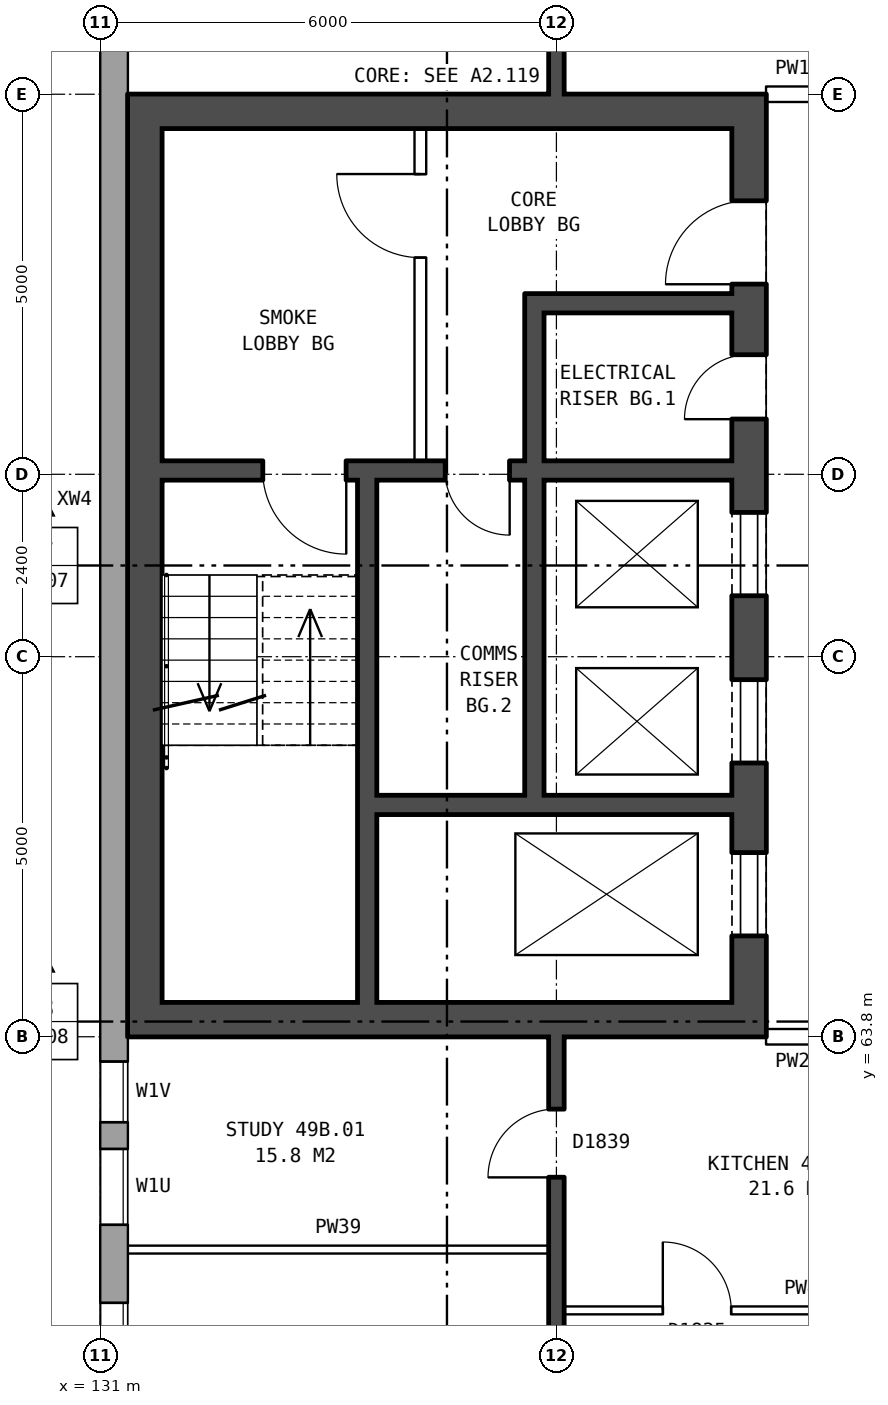
"""IFC4 building model, lengths in metres.
Left out: names, types, materials, properties, quantities, classifications, styles, units other than length and angle.
Written with IfcOpenShell. Run it as: python <this file> out.ifc"""

import sys

from ifc_helpers import new_model, si_unit, direction, frame, frame_2d, origin, place, context, subcontext, project, spatial, rectangle, extrude, element, fill, save


model = new_model("IFC4")
c1 = context("Model", 3, precision=1e-05, world=origin(), true_north=direction((0.0, 1.0)))
c2 = subcontext(c1, "Body", "Model", "MODEL_VIEW")
j1 = project(units=[si_unit("LENGTHUNIT", "METRE"), si_unit("PLANEANGLEUNIT", "RADIAN")], contexts=[c1])
p1 = place(None, origin())
s1 = spatial("IfcSite", under=j1, at=p1, CompositionType="ELEMENT")
p2 = place(p1, origin())
s2 = spatial("IfcBuilding", under=s1, at=p2, CompositionType="ELEMENT")
p3 = place(p2, frame((0.0, 0.0, 175.8)))
s3 = spatial("IfcBuildingStorey", under=s2, at=p3, CompositionType="ELEMENT", Elevation=175.8)
p4 = place(p3, frame((131.18, 82.925, 0.0), z_axis=(0.0, 0.0, 1.0), x_axis=(0.0, -1.0, 0.0)))
e1 = element("IfcWall", 1, at=p4, inside=s3, PredefinedType="STANDARD", context=c2, shape_type="SweptSolid", body=[
    extrude(rectangle(XDim=25.851, YDim=0.36, at=frame_2d((12.925, 0.0))), origin(), (0.0, 0.0, 1.0), 2.85),
])
p5 = place(p4, frame((1.625, 0.0, 0.8)))
e2 = element("IfcOpeningElement", 2, at=p5, cuts=e1, PredefinedType="OPENING", context=c2, shape_type="SweptSolid", body=[
    extrude(rectangle(XDim=1.6, YDim=1.8, at=frame_2d((0.8, 0.9))), frame((0.0, 0.19, 0.0), z_axis=(0.0, -1.0, 0.0), x_axis=(1.0, 0.0, 0.0)), (0.0, 0.0, 1.0), 0.38),
])
p6 = place(p4, frame((3.525, 0.0, 1.1)))
e3 = element("IfcOpeningElement", 3, at=p6, cuts=e1, PredefinedType="OPENING", context=c2, shape_type="SweptSolid", body=[
    extrude(rectangle(XDim=0.8, YDim=1.5, at=frame_2d((0.4, 0.75))), frame((0.0, 0.19, 0.0), z_axis=(0.0, -1.0, 0.0), x_axis=(1.0, 0.0, 0.0)), (0.0, 0.0, 1.0), 0.38),
])
p7 = place(p4, frame((19.45, 0.0, 0.35)))
e4 = element("IfcOpeningElement", 4, at=p7, cuts=e1, PredefinedType="OPENING", context=c2, shape_type="SweptSolid", body=[
    extrude(rectangle(XDim=0.8, YDim=0.9, at=frame_2d((0.4, 0.45))), frame((0.0, 0.19, 0.0), z_axis=(0.0, -1.0, 0.0), x_axis=(1.0, 0.0, 0.0)), (0.0, 0.0, 1.0), 0.38),
])
p8 = place(p4, frame((22.625, 0.0, 0.8)))
e5 = element("IfcOpeningElement", 5, at=p8, cuts=e1, PredefinedType="OPENING", context=c2, shape_type="SweptSolid", body=[
    extrude(rectangle(XDim=1.6, YDim=1.8, at=frame_2d((0.8, 0.9))), frame((0.0, 0.19, 0.0), z_axis=(0.0, -1.0, 0.0), x_axis=(1.0, 0.0, 0.0)), (0.0, 0.0, 1.0), 0.38),
])
p9 = place(p4, frame((4.625, 0.0, 1.7)))
e6 = element("IfcOpeningElement", 6, at=p9, cuts=e1, PredefinedType="OPENING", context=c2, shape_type="SweptSolid", body=[
    extrude(rectangle(XDim=0.6, YDim=0.9, at=frame_2d((0.3, 0.45))), frame((0.0, 0.19, 0.0), z_axis=(0.0, -1.0, 0.0), x_axis=(1.0, 0.0, 0.0)), (0.0, 0.0, 1.0), 0.38),
])
p10 = place(p4, frame((20.6, 0.0, 1.65)))
e7 = element("IfcOpeningElement", 7, at=p10, cuts=e1, PredefinedType="OPENING", context=c2, shape_type="SweptSolid", body=[
    extrude(rectangle(XDim=1.0, YDim=0.9, at=frame_2d((0.5, 0.45))), frame((0.0, 0.19, 0.0), z_axis=(0.0, -1.0, 0.0), x_axis=(1.0, 0.0, 0.0)), (0.0, 0.0, 1.0), 0.38),
])
p11 = place(p3, frame((139.535, 63.8, 0.0), z_axis=(0.0, 0.0, 1.0), x_axis=(0.0, 1.0, 0.0)))
e8 = element("IfcWall", 8, at=p11, inside=s3, PredefinedType="SHEAR", context=c2, shape_type="SweptSolid", body=[
    extrude(rectangle(XDim=12.4, YDim=0.45, at=frame_2d((6.2, 0.0))), origin(), (0.0, 0.0, 1.0), 2.85),
])
p12 = place(p11, frame((1.325, 0.0, 0.0)))
e9 = element("IfcOpeningElement", 9, at=p12, cuts=e8, PredefinedType="OPENING", context=c2, shape_type="SweptSolid", body=[
    extrude(rectangle(XDim=1.1, YDim=2.1, at=frame_2d((0.55, 1.05))), frame((0.0, 0.235, 0.0), z_axis=(0.0, -1.0, 0.0), x_axis=(1.0, 0.0, 0.0)), (0.0, 0.0, 1.0), 0.47),
])
p13 = place(p11, frame((3.6, 0.0, 0.0)))
e10 = element("IfcOpeningElement", 10, at=p13, cuts=e8, PredefinedType="OPENING", context=c2, shape_type="SweptSolid", body=[
    extrude(rectangle(XDim=1.1, YDim=2.1, at=frame_2d((0.55, 1.05))), frame((0.0, 0.235, 0.0), z_axis=(0.0, -1.0, 0.0), x_axis=(1.0, 0.0, 0.0)), (0.0, 0.0, 1.0), 0.47),
])
p14 = place(p11, frame((5.8, 0.0, 0.0)))
e11 = element("IfcOpeningElement", 11, at=p14, cuts=e8, PredefinedType="OPENING", context=c2, shape_type="SweptSolid", body=[
    extrude(rectangle(XDim=1.1, YDim=2.1, at=frame_2d((0.55, 1.05))), frame((0.0, 0.235, 0.0), z_axis=(0.0, -1.0, 0.0), x_axis=(1.0, 0.0, 0.0)), (0.0, 0.0, 1.0), 0.47),
])
p15 = place(p11, frame((9.9, 0.0, 0.0)))
e12 = element("IfcOpeningElement", 12, at=p15, cuts=e8, PredefinedType="OPENING", context=c2, shape_type="SweptSolid", body=[
    extrude(rectangle(XDim=1.1, YDim=2.1, at=frame_2d((0.55, 1.05))), frame((0.0, 0.235, 0.0), z_axis=(0.0, -1.0, 0.0), x_axis=(1.0, 0.0, 0.0)), (0.0, 0.0, 1.0), 0.47),
])
p16 = place(p11, frame((8.125, 0.0, 0.0)))
e13 = element("IfcOpeningElement", 13, at=p16, cuts=e8, PredefinedType="OPENING", context=c2, shape_type="SweptSolid", body=[
    extrude(rectangle(XDim=0.85, YDim=2.1, at=frame_2d((0.425, 1.05))), frame((0.0, 0.235, 0.0), z_axis=(0.0, -1.0, 0.0), x_axis=(1.0, 0.0, 0.0)), (0.0, 0.0, 1.0), 0.47),
])
p17 = place(p3, frame((131.585, 63.8, 0.0), z_axis=(0.0, 0.0, 1.0), x_axis=(0.0, 1.0, 0.0)))
e14 = element("IfcWall", 14, at=p17, inside=s3, PredefinedType="SHEAR", context=c2, shape_type="SweptSolid", body=[
    extrude(rectangle(XDim=12.4, YDim=0.45, at=frame_2d((6.2, 0.0))), origin(), (0.0, 0.0, 1.0), 2.85),
])
for number, where, z_axis, x_axis in (
    (15, (139.31, 64.025, 0.0), (0.0, 0.0, 1.0), (-1.0, 0.0, 0.0)),
    (16, (139.31, 75.975, 0.0), (0.0, 0.0, 1.0), (-1.0, 0.0, 0.0)),
):
    element("IfcWall", number, at=place(p3, frame(where, z_axis=z_axis, x_axis=x_axis)), inside=s3, PredefinedType="SHEAR", context=c2, shape_type="SweptSolid", body=[
        extrude(rectangle(XDim=7.5, YDim=0.45, at=frame_2d((3.75, 0.0))), origin(), (0.0, 0.0, 1.0), 2.85),
    ])
p18 = place(p3, frame((139.31, 66.85, 0.0), z_axis=(0.0, 0.0, 1.0), x_axis=(-1.0, 0.0, 0.0)))
e17 = element("IfcWall", 17, at=p18, inside=s3, PredefinedType="SHEAR", context=c2, shape_type="SweptSolid", body=[
    extrude(rectangle(XDim=4.675, YDim=0.25, at=frame_2d((2.337, 0.0))), origin(), (0.0, 0.0, 1.0), 2.85),
])
p19 = place(p3, frame((139.31, 71.25, 0.0), z_axis=(0.0, 0.0, 1.0), x_axis=(-1.0, 0.0, 0.0)))
e18 = element("IfcWall", 18, at=p19, inside=s3, PredefinedType="SHEAR", context=c2, shape_type="SweptSolid", body=[
    extrude(rectangle(XDim=7.5, YDim=0.25, at=frame_2d((3.75, 0.0))), origin(), (0.0, 0.0, 1.0), 2.85),
])
p20 = place(p19, frame((5.075, 0.0, 0.0)))
e19 = element("IfcOpeningElement", 19, at=p20, cuts=e18, PredefinedType="OPENING", context=c2, shape_type="SweptSolid", body=[
    extrude(rectangle(XDim=1.1, YDim=2.1, at=frame_2d((0.55, 1.05))), frame((0.0, 0.135, 0.0), z_axis=(0.0, -1.0, 0.0), x_axis=(1.0, 0.0, 0.0)), (0.0, 0.0, 1.0), 0.27),
])
p21 = place(p19, frame((2.925, 0.0, 0.0)))
e20 = element("IfcOpeningElement", 20, at=p21, cuts=e18, PredefinedType="OPENING", context=c2, shape_type="SweptSolid", body=[
    extrude(rectangle(XDim=0.85, YDim=2.1, at=frame_2d((0.425, 1.05))), frame((0.0, 0.135, 0.0), z_axis=(0.0, -1.0, 0.0), x_axis=(1.0, 0.0, 0.0)), (0.0, 0.0, 1.0), 0.27),
])
p22 = place(p3, frame((139.31, 73.45, 0.0), z_axis=(0.0, 0.0, 1.0), x_axis=(-1.0, 0.0, 0.0)))
e21 = element("IfcWall", 21, at=p22, inside=s3, PredefinedType="SHEAR", context=c2, shape_type="SweptSolid", body=[
    extrude(rectangle(XDim=2.475, YDim=0.25, at=frame_2d((1.238, 0.0))), origin(), (0.0, 0.0, 1.0), 2.85),
])
p23 = place(p3, frame((136.71, 66.975, 0.0), z_axis=(0.0, 0.0, 1.0), x_axis=(0.0, 1.0, 0.0)))
e22 = element("IfcWall", 22, at=p23, inside=s3, PredefinedType="SHEAR", context=c2, shape_type="SweptSolid", body=[
    extrude(rectangle(XDim=4.15, YDim=0.25, at=frame_2d((2.075, 0.0))), origin(), (0.0, 0.0, 1.0), 2.85),
])
p24 = place(p3, frame((136.71, 71.375, 0.0), z_axis=(0.0, 0.0, 1.0), x_axis=(0.0, 1.0, 0.0)))
e23 = element("IfcWall", 23, at=p24, inside=s3, PredefinedType="SHEAR", context=c2, shape_type="SweptSolid", body=[
    extrude(rectangle(XDim=2.2, YDim=0.25, at=frame_2d((1.1, 0.0))), origin(), (0.0, 0.0, 1.0), 2.85),
])
p25 = place(p3, frame((135.21, 71.375, 0.0), z_axis=(0.0, 0.0, 1.0), x_axis=(0.0, 1.0, 0.0)))
e24 = element("IfcWall", 24, at=p25, inside=s3, PredefinedType="PARTITIONING", context=c2, shape_type="SweptSolid", body=[
    extrude(rectangle(XDim=4.375, YDim=0.15, at=frame_2d((2.188, 0.0))), origin(), (0.0, 0.0, 1.0), 2.85),
])
p26 = place(p25, frame((2.675, 0.0, 0.0)))
e25 = element("IfcOpeningElement", 25, at=p26, cuts=e24, PredefinedType="OPENING", context=c2, shape_type="SweptSolid", body=[
    extrude(rectangle(XDim=1.1, YDim=2.1, at=frame_2d((0.55, 1.05))), frame((0.0, 0.085, 0.0), z_axis=(0.0, -1.0, 0.0), x_axis=(1.0, 0.0, 0.0)), (0.0, 0.0, 1.0), 0.17),
])
p27 = place(p3, frame((134.51, 64.25, 0.0), z_axis=(0.0, 0.0, 1.0), x_axis=(0.0, 1.0, 0.0)))
e26 = element("IfcWall", 26, at=p27, inside=s3, PredefinedType="SHEAR", context=c2, shape_type="SweptSolid", body=[
    extrude(rectangle(XDim=6.875, YDim=0.25, at=frame_2d((3.438, 0.0))), origin(), (0.0, 0.0, 1.0), 2.85),
])
p28 = place(p3, frame((137.1, 60.2, 0.0), z_axis=(0.0, 0.0, 1.0), x_axis=(1.0, 0.0, 0.0)))
e27 = element("IfcWall", 27, at=p28, inside=s3, PredefinedType="PARTITIONING", context=c2, shape_type="SweptSolid", body=[
    extrude(rectangle(XDim=5.8, YDim=0.1, at=frame_2d((2.9, 0.0))), origin(), (0.0, 0.0, 1.0), 2.85),
])
p29 = place(p28, frame((1.3, 0.0, 0.0)))
e28 = element("IfcOpeningElement", 28, at=p29, cuts=e27, PredefinedType="OPENING", context=c2, shape_type="SweptSolid", body=[
    extrude(rectangle(XDim=0.9, YDim=2.1, at=frame_2d((0.45, 1.05))), frame((0.0, 0.06, 0.0), z_axis=(0.0, -1.0, 0.0), x_axis=(1.0, 0.0, 0.0)), (0.0, 0.0, 1.0), 0.12),
])
p30 = place(p28, frame((4.2, 0.0, 0.0)))
e29 = element("IfcOpeningElement", 29, at=p30, cuts=e27, PredefinedType="OPENING", context=c2, shape_type="SweptSolid", body=[
    extrude(rectangle(XDim=0.9, YDim=2.1, at=frame_2d((0.45, 1.05))), frame((0.0, 0.06, 0.0), z_axis=(0.0, -1.0, 0.0), x_axis=(1.0, 0.0, 0.0)), (0.0, 0.0, 1.0), 0.12),
])
p31 = place(p3, frame((131.36, 61.0, 0.0), z_axis=(0.0, 0.0, 1.0), x_axis=(1.0, 0.0, 0.0)))
e30 = element("IfcWall", 30, at=p31, inside=s3, PredefinedType="PARTITIONING", context=c2, shape_type="SweptSolid", body=[
    extrude(rectangle(XDim=5.54, YDim=0.1, at=frame_2d((2.77, 0.0))), origin(), (0.0, 0.0, 1.0), 2.85),
])
p32 = place(p3, frame((139.76, 63.8, 0.0), z_axis=(0.0, 0.0, 1.0), x_axis=(1.0, 0.0, 0.0)))
e31 = element("IfcWall", 31, at=p32, inside=s3, PredefinedType="PARTITIONING", context=c2, shape_type="SweptSolid", body=[
    extrude(rectangle(XDim=3.0, YDim=0.2, at=frame_2d((1.5, 0.0))), origin(), (0.0, 0.0, 1.0), 2.85),
])
p33 = place(p32, frame((1.0, 0.0, 0.0)))
e32 = element("IfcOpeningElement", 32, at=p33, cuts=e31, PredefinedType="OPENING", context=c2, shape_type="SweptSolid", body=[
    extrude(rectangle(XDim=1.0, YDim=2.1, at=frame_2d((0.5, 1.05))), frame((0.0, 0.11, 0.0), z_axis=(0.0, -1.0, 0.0), x_axis=(1.0, 0.0, 0.0)), (0.0, 0.0, 1.0), 0.22),
])
p34 = place(p3, frame((139.76, 76.2, 0.0), z_axis=(0.0, 0.0, 1.0), x_axis=(1.0, 0.0, 0.0)))
e33 = element("IfcWall", 33, at=p34, inside=s3, PredefinedType="PARTITIONING", context=c2, shape_type="SweptSolid", body=[
    extrude(rectangle(XDim=3.0, YDim=0.2, at=frame_2d((1.5, 0.0))), origin(), (0.0, 0.0, 1.0), 2.85),
])
p35 = place(p34, frame((1.0, 0.0, 0.0)))
e34 = element("IfcOpeningElement", 34, at=p35, cuts=e33, PredefinedType="OPENING", context=c2, shape_type="SweptSolid", body=[
    extrude(rectangle(XDim=1.0, YDim=2.1, at=frame_2d((0.5, 1.05))), frame((0.0, 0.11, 0.0), z_axis=(0.0, -1.0, 0.0), x_axis=(1.0, 0.0, 0.0)), (0.0, 0.0, 1.0), 0.22),
])
p36 = place(p3, frame((137.0, 54.36, 0.0), z_axis=(0.0, 0.0, 1.0), x_axis=(0.0, 1.0, 0.0)))
e35 = element("IfcWall", 35, at=p36, inside=s3, PredefinedType="SOLIDWALL", context=c2, shape_type="SweptSolid", body=[
    extrude(rectangle(XDim=9.44, YDim=0.2, at=frame_2d((4.72, 0.0))), origin(), (0.0, 0.0, 1.0), 2.85),
])
p37 = place(p36, frame((2.47, 0.0, 0.0)))
e36 = element("IfcOpeningElement", 36, at=p37, cuts=e35, PredefinedType="OPENING", context=c2, shape_type="SweptSolid", body=[
    extrude(rectangle(XDim=0.9, YDim=2.1, at=frame_2d((0.45, 1.05))), frame((0.0, 0.11, 0.0), z_axis=(0.0, -1.0, 0.0), x_axis=(1.0, 0.0, 0.0)), (0.0, 0.0, 1.0), 0.22),
])
p38 = place(p36, frame((7.59, 0.0, 0.0)))
e37 = element("IfcOpeningElement", 37, at=p38, cuts=e35, PredefinedType="OPENING", context=c2, shape_type="SweptSolid", body=[
    extrude(rectangle(XDim=0.9, YDim=2.1, at=frame_2d((0.45, 1.05))), frame((0.0, 0.11, 0.0), z_axis=(0.0, -1.0, 0.0), x_axis=(1.0, 0.0, 0.0)), (0.0, 0.0, 1.0), 0.22),
])
p39 = place(p3, frame((137.0, 76.2, 0.0), z_axis=(0.0, 0.0, 1.0), x_axis=(0.0, 1.0, 0.0)))
e38 = element("IfcWall", 38, at=p39, inside=s3, PredefinedType="SOLIDWALL", context=c2, shape_type="SweptSolid", body=[
    extrude(rectangle(XDim=9.44, YDim=0.2, at=frame_2d((4.72, 0.0))), origin(), (0.0, 0.0, 1.0), 2.85),
])
p40 = place(p39, frame((1.5, 0.0, 0.0)))
e39 = element("IfcOpeningElement", 39, at=p40, cuts=e38, PredefinedType="OPENING", context=c2, shape_type="SweptSolid", body=[
    extrude(rectangle(XDim=0.9, YDim=2.1, at=frame_2d((0.45, 1.05))), frame((0.0, 0.11, 0.0), z_axis=(0.0, -1.0, 0.0), x_axis=(1.0, 0.0, 0.0)), (0.0, 0.0, 1.0), 0.22),
])
p41 = place(p7, origin())
e40 = element("IfcWindow", 40, at=p41, inside=s3, PartitioningType="SINGLE_PANEL", PredefinedType="WINDOW", context=c2, shape_type="SweptSolid", body=[
    extrude(rectangle(XDim=0.8, YDim=0.9, at=frame_2d((0.4, 0.45))), frame((0.0, 0.15, 0.0), z_axis=(0.0, -1.0, 0.0), x_axis=(1.0, 0.0, 0.0)), (0.0, 0.0, 1.0), 0.06),
])
fill(e4, e40)
p42 = place(p8, origin())
e41 = element("IfcWindow", 41, at=p42, inside=s3, PartitioningType="SINGLE_PANEL", PredefinedType="WINDOW", context=c2, shape_type="SweptSolid", body=[
    extrude(rectangle(XDim=1.6, YDim=1.8, at=frame_2d((0.8, 0.9))), frame((0.0, 0.15, 0.0), z_axis=(0.0, -1.0, 0.0), x_axis=(1.0, 0.0, 0.0)), (0.0, 0.0, 1.0), 0.06),
])
fill(e5, e41)
p43 = place(p12, origin())
e42 = element("IfcDoor", 42, at=p43, inside=s3, OperationType="DOUBLE_DOOR_SLIDING", PredefinedType="DOOR", context=c2, shape_type="SweptSolid", body=[
    extrude(rectangle(XDim=1.1, YDim=2.1, at=frame_2d((0.55, 1.05))), frame((0.0, 0.21, 0.0), z_axis=(0.0, -1.0, 0.0), x_axis=(1.0, 0.0, 0.0)), (0.0, 0.0, 1.0), 0.05),
])
fill(e9, e42)
p44 = place(p13, origin())
e43 = element("IfcDoor", 43, at=p44, inside=s3, OperationType="DOUBLE_DOOR_SLIDING", PredefinedType="DOOR", context=c2, shape_type="SweptSolid", body=[
    extrude(rectangle(XDim=1.1, YDim=2.1, at=frame_2d((0.55, 1.05))), frame((0.0, 0.21, 0.0), z_axis=(0.0, -1.0, 0.0), x_axis=(1.0, 0.0, 0.0)), (0.0, 0.0, 1.0), 0.05),
])
fill(e10, e43)
p45 = place(p14, origin())
e44 = element("IfcDoor", 44, at=p45, inside=s3, OperationType="DOUBLE_DOOR_SLIDING", PredefinedType="DOOR", context=c2, shape_type="SweptSolid", body=[
    extrude(rectangle(XDim=1.1, YDim=2.1, at=frame_2d((0.55, 1.05))), frame((0.0, 0.21, 0.0), z_axis=(0.0, -1.0, 0.0), x_axis=(1.0, 0.0, 0.0)), (0.0, 0.0, 1.0), 0.05),
])
fill(e11, e44)
p46 = place(p15, origin())
e45 = element("IfcDoor", 45, at=p46, inside=s3, OperationType="SINGLE_SWING_LEFT", PredefinedType="DOOR", context=c2, shape_type="SweptSolid", body=[
    extrude(rectangle(XDim=1.1, YDim=2.1, at=frame_2d((0.55, 1.05))), frame((0.0, 0.21, 0.0), z_axis=(0.0, -1.0, 0.0), x_axis=(1.0, 0.0, 0.0)), (0.0, 0.0, 1.0), 0.05),
])
fill(e12, e45)
p47 = place(p26, origin())
e46 = element("IfcDoor", 46, at=p47, inside=s3, OperationType="SINGLE_SWING_RIGHT", PredefinedType="DOOR", context=c2, shape_type="SweptSolid", body=[
    extrude(rectangle(XDim=1.1, YDim=2.1, at=frame_2d((0.55, 1.05))), frame((0.0, 0.025, 0.0), z_axis=(0.0, -1.0, 0.0), x_axis=(1.0, 0.0, 0.0)), (0.0, 0.0, 1.0), 0.05),
])
fill(e25, e46)
p48 = place(p20, origin())
e47 = element("IfcDoor", 47, at=p48, inside=s3, OperationType="SINGLE_SWING_LEFT", PredefinedType="DOOR", context=c2, shape_type="SweptSolid", body=[
    extrude(rectangle(XDim=1.1, YDim=2.1, at=frame_2d((0.55, 1.05))), frame((0.0, 0.025, 0.0), z_axis=(0.0, -1.0, 0.0), x_axis=(1.0, 0.0, 0.0)), (0.0, 0.0, 1.0), 0.05),
])
fill(e19, e47)
p49 = place(p16, origin())
e48 = element("IfcDoor", 48, at=p49, inside=s3, OperationType="SINGLE_SWING_LEFT", PredefinedType="DOOR", context=c2, shape_type="SweptSolid", body=[
    extrude(rectangle(XDim=0.85, YDim=2.1, at=frame_2d((0.425, 1.05))), frame((0.0, 0.21, 0.0), z_axis=(0.0, -1.0, 0.0), x_axis=(1.0, 0.0, 0.0)), (0.0, 0.0, 1.0), 0.05),
])
fill(e13, e48)
p50 = place(p21, origin())
e49 = element("IfcDoor", 49, at=p50, inside=s3, OperationType="SINGLE_SWING_LEFT", PredefinedType="DOOR", context=c2, shape_type="SweptSolid", body=[
    extrude(rectangle(XDim=0.85, YDim=2.1, at=frame_2d((0.425, 1.05))), frame((0.0, 0.025, 0.0), z_axis=(0.0, -1.0, 0.0), x_axis=(1.0, 0.0, 0.0)), (0.0, 0.0, 1.0), 0.05),
])
fill(e20, e49)
p51 = place(p38, origin())
e50 = element("IfcDoor", 50, at=p51, inside=s3, OperationType="SINGLE_SWING_LEFT", PredefinedType="DOOR", context=c2, shape_type="SweptSolid", body=[
    extrude(rectangle(XDim=0.9, YDim=2.1, at=frame_2d((0.45, 1.05))), frame((0.0, 0.025, 0.0), z_axis=(0.0, -1.0, 0.0), x_axis=(1.0, 0.0, 0.0)), (0.0, 0.0, 1.0), 0.05),
])
fill(e37, e50)
p52 = place(p29, origin())
e51 = element("IfcDoor", 51, at=p52, inside=s3, OperationType="SINGLE_SWING_LEFT", PredefinedType="DOOR", context=c2, shape_type="SweptSolid", body=[
    extrude(rectangle(XDim=0.9, YDim=2.1, at=frame_2d((0.45, 1.05))), frame((0.0, 0.025, 0.0), z_axis=(0.0, -1.0, 0.0), x_axis=(1.0, 0.0, 0.0)), (0.0, 0.0, 1.0), 0.05),
])
fill(e28, e51)
p53 = place(p10, origin())
e52 = element("IfcWindow", 52, at=p53, inside=s3, PartitioningType="SINGLE_PANEL", PredefinedType="WINDOW", context=c2, shape_type="SweptSolid", body=[
    extrude(rectangle(XDim=1.0, YDim=0.9, at=frame_2d((0.5, 0.45))), frame((0.0, 0.15, 0.0), z_axis=(0.0, -1.0, 0.0), x_axis=(1.0, 0.0, 0.0)), (0.0, 0.0, 1.0), 0.06),
])
fill(e7, e52)
save(model, sys.argv[1])
